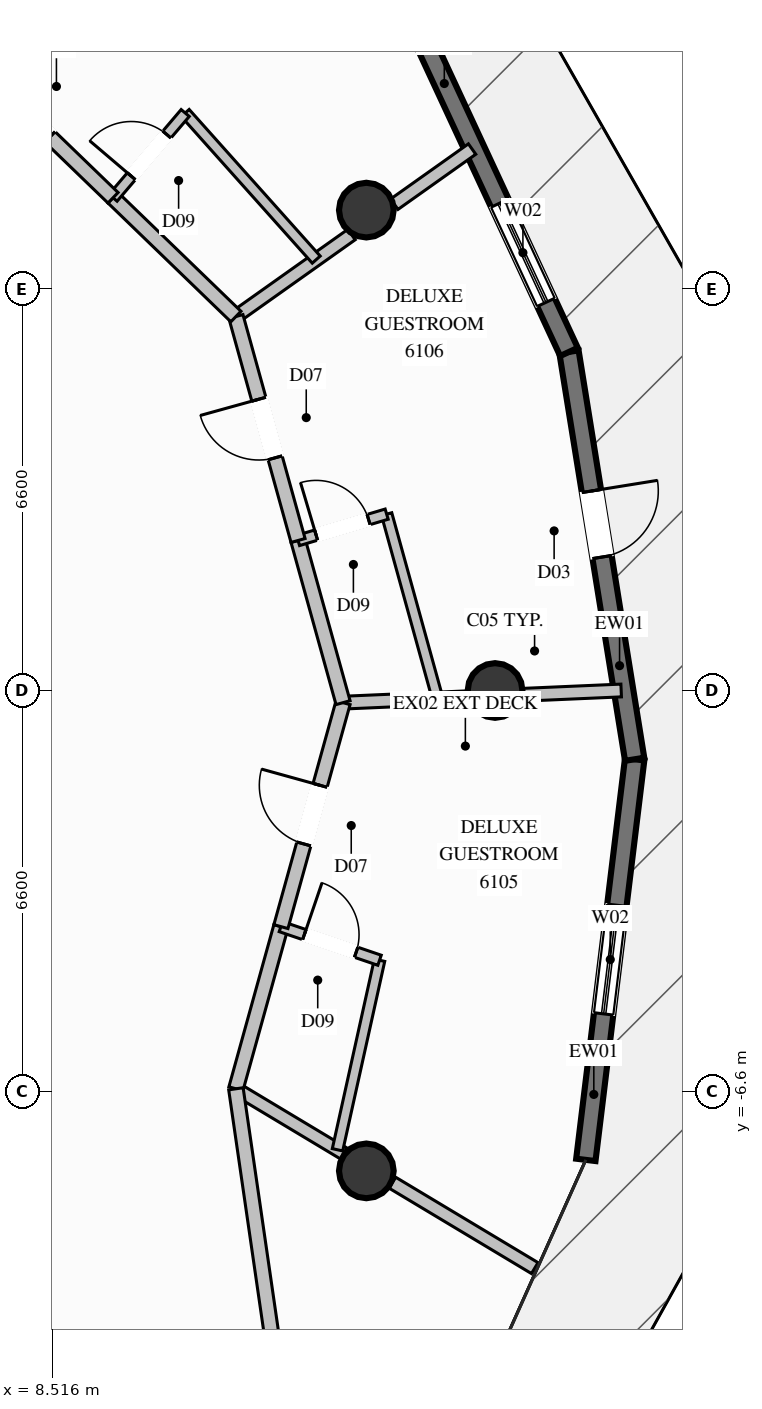
"""IFC4 building model, lengths in metres.
Left out: names, types, materials, properties, quantities, classifications, styles, units other than length and angle.
Written with IfcOpenShell. Run it as: python <this file> out.ifc"""

import sys

from ifc_helpers import new_model, si_unit, direction, frame, frame_2d, origin, origin_2d, place, context, subcontext, project, spatial, rectangle, circle, extrude, element, fill, save


model = new_model("IFC4")
c1 = context("Model", 3, precision=1e-05, world=origin(), true_north=direction((0.0, 1.0)))
c2 = subcontext(c1, "Body", "Model", "MODEL_VIEW")
j1 = project(units=[si_unit("LENGTHUNIT", "METRE"), si_unit("PLANEANGLEUNIT", "RADIAN")], contexts=[c1])
p1 = place(None, origin())
s1 = spatial("IfcSite", under=j1, at=p1, CompositionType="ELEMENT")
p2 = place(p1, origin())
s2 = spatial("IfcBuilding", under=s1, at=p2, CompositionType="ELEMENT")
p3 = place(p2, frame((0.0, 0.0, 227.2)))
s3 = spatial("IfcBuildingStorey", under=s2, at=p3, CompositionType="ELEMENT", Elevation=227.2)
for number, where, z_axis, x_axis in (
    (1, (15.8, 0.0, 0.0), (0.0, 0.0, 1.0), (1.0, 0.0, 0.0)),
    (2, (13.683, 7.9, 0.0), (0.0, 0.0, 1.0), (1.0, 0.0, 0.0)),
    (3, (13.683, -7.9, 0.0), (0.0, 0.0, 1.0), (1.0, 0.0, 0.0)),
):
    element("IfcColumn", number, at=place(p3, frame(where, z_axis=z_axis, x_axis=x_axis)), inside=s3, PredefinedType="COLUMN", context=c2, shape_type="SweptSolid", body=[
        extrude(circle(Radius=0.45, at=origin_2d()), origin(), (0.0, 0.0, 1.0), 3.6),
    ])
p4 = place(p3, frame((18.096, -1.131, 0.0), z_axis=(0.0, 0.0, 1.0), x_axis=(-0.12099160472, -0.992653530486, 0.0)))
e4 = element("IfcWall", 4, at=p4, inside=s3, PredefinedType="SOLIDWALL", context=c2, shape_type="SweptSolid", body=[
    extrude(rectangle(XDim=6.637, YDim=0.32, at=frame_2d((3.318, 0.0))), origin(), (0.0, 0.0, 1.0), 3.36),
])
p5 = place(p4, frame((2.418, 0.0, 0.35)))
e5 = element("IfcOpeningElement", 5, at=p5, cuts=e4, PredefinedType="OPENING", context=c2, shape_type="SweptSolid", body=[
    extrude(rectangle(XDim=1.8, YDim=2.6, at=frame_2d((0.9, 1.3))), frame((0.0, 0.17, 0.0), z_axis=(0.0, -1.0, 0.0), x_axis=(1.0, 0.0, 0.0)), (0.0, 0.0, 1.0), 0.34),
])
p6 = place(p3, frame((17.016, 5.568, 0.0), z_axis=(0.0, 0.0, 1.0), x_axis=(0.159134025561, -0.987256988787, 0.0)))
e6 = element("IfcWall", 6, at=p6, inside=s3, PredefinedType="SOLIDWALL", context=c2, shape_type="SweptSolid", body=[
    extrude(rectangle(XDim=6.786, YDim=0.32, at=frame_2d((3.393, 0.0))), origin(), (0.0, 0.0, 1.0), 3.36),
])
p7 = place(p6, frame((2.317, 0.0, 0.0)))
e7 = element("IfcOpeningElement", 7, at=p7, cuts=e6, PredefinedType="OPENING", context=c2, shape_type="SweptSolid", body=[
    extrude(rectangle(XDim=1.1, YDim=2.2, at=frame_2d((0.55, 1.1))), frame((0.0, 0.17, 0.0), z_axis=(0.0, -1.0, 0.0), x_axis=(1.0, 0.0, 0.0)), (0.0, 0.0, 1.0), 0.34),
])
p8 = place(p3, frame((14.157, 11.721, 0.0), z_axis=(0.0, 0.0, 1.0), x_axis=(0.421409426627, -0.906870495247, 0.0)))
e8 = element("IfcWall", 8, at=p8, inside=s3, PredefinedType="SOLIDWALL", context=c2, shape_type="SweptSolid", body=[
    extrude(rectangle(XDim=6.785, YDim=0.32, at=frame_2d((3.392, 0.0))), origin(), (0.0, 0.0, 1.0), 3.36),
])
p9 = place(p8, frame((4.086, 0.0, 0.35)))
e9 = element("IfcOpeningElement", 9, at=p9, cuts=e8, PredefinedType="OPENING", context=c2, shape_type="SweptSolid", body=[
    extrude(rectangle(XDim=1.8, YDim=2.6, at=frame_2d((0.9, 1.3))), frame((0.0, 0.17, 0.0), z_axis=(0.0, -1.0, 0.0), x_axis=(1.0, 0.0, 0.0)), (0.0, 0.0, 1.0), 0.34),
])
p10 = place(p3, frame((13.3, -0.2, 0.0), z_axis=(0.0, 0.0, 1.0), x_axis=(0.999055257084, 0.043457948563, 0.0)))
e10 = element("IfcWall", 10, at=p10, inside=s3, PredefinedType="PARTITIONING", context=c2, shape_type="SweptSolid", body=[
    extrude(rectangle(XDim=2.045, YDim=0.21, at=frame_2d((1.022, 0.0))), origin(), (0.0, 0.0, 1.0), 3.36),
])
p11 = place(p3, frame((16.265, -0.07, 0.0), z_axis=(0.0, 0.0, 1.0), x_axis=(0.99905329622, 0.043503003492, 0.0)))
e11 = element("IfcWall", 11, at=p11, inside=s3, PredefinedType="PARTITIONING", context=c2, shape_type="SweptSolid", body=[
    extrude(rectangle(XDim=1.611, YDim=0.21, at=frame_2d((0.805, 0.0))), origin(), (0.0, 0.0, 1.0), 3.36),
])
p12 = place(p3, frame((11.538, 6.15, 0.0), z_axis=(0.0, 0.0, 1.0), x_axis=(0.815682557634, 0.578499753822, 0.0)))
e12 = element("IfcWall", 12, at=p12, inside=s3, PredefinedType="PARTITIONING", context=c2, shape_type="SweptSolid", body=[
    extrude(rectangle(XDim=2.33, YDim=0.21, at=frame_2d((1.165, 0.0))), origin(), (0.0, 0.0, 1.0), 2.876),
])
p13 = place(p3, frame((14.143, 7.997, 0.0), z_axis=(0.0, 0.0, 1.0), x_axis=(0.815727547958, 0.5784363124, 0.0)))
e13 = element("IfcWall", 13, at=p13, inside=s3, PredefinedType="PARTITIONING", context=c2, shape_type="SweptSolid", body=[
    extrude(rectangle(XDim=1.568, YDim=0.21, at=frame_2d((0.784, 0.0))), origin(), (0.0, 0.0, 1.0), 3.36),
])
p14 = place(p3, frame((11.538, -6.55, 0.0), z_axis=(0.0, 0.0, 1.0), x_axis=(0.85753462299, -0.514426253582, 0.0)))
e14 = element("IfcWall", 14, at=p14, inside=s3, PredefinedType="PARTITIONING", context=c2, shape_type="SweptSolid", body=[
    extrude(rectangle(XDim=2.066, YDim=0.21, at=frame_2d((1.033, 0.0))), origin(), (0.0, 0.0, 1.0), 2.876),
])
p15 = place(p3, frame((14.111, -8.094, 0.0), z_axis=(0.0, 0.0, 1.0), x_axis=(0.857500813626, -0.514482608676, 0.0)))
e15 = element("IfcWall", 15, at=p15, inside=s3, PredefinedType="PARTITIONING", context=c2, shape_type="SweptSolid", body=[
    extrude(rectangle(XDim=2.731, YDim=0.21, at=frame_2d((1.365, 0.0))), origin(), (0.0, 0.0, 1.0), 3.36),
])
p16 = place(p3, frame((11.538, -6.55, 0.0), z_axis=(0.0, 0.0, 1.0), x_axis=(0.267361785392, 0.963596220266, 0.0)))
e16 = element("IfcWall", 16, at=p16, inside=s3, PredefinedType="PARTITIONING", context=c2, shape_type="SweptSolid", body=[
    extrude(rectangle(XDim=2.768, YDim=0.24, at=frame_2d((1.384, 0.0))), origin(), (0.0, 0.0, 1.0), 3.36),
])
p17 = place(p3, frame((13.209, -7.553, 0.0), z_axis=(0.0, 0.0, 1.0), x_axis=(0.216412225458, 0.976302078597, 0.0)))
e17 = element("IfcWall", 17, at=p17, inside=s3, PredefinedType="PLUMBINGWALL", context=c2, shape_type="SweptSolid", body=[
    extrude(rectangle(XDim=3.193, YDim=0.175, at=frame_2d((1.596, 0.0))), origin(), (0.0, 0.0, 1.0), 2.929),
])
p18 = place(p3, frame((12.278, -3.883, 0.0), z_axis=(0.0, 0.0, 1.0), x_axis=(0.946495352368, -0.322717442889, 0.0)))
e18 = element("IfcWall", 18, at=p18, inside=s3, PredefinedType="PLUMBINGWALL", context=c2, shape_type="SweptSolid", body=[
    extrude(rectangle(XDim=1.714, YDim=0.175, at=frame_2d((0.857, 0.0))), origin(), (0.0, 0.0, 1.0), 3.36),
])
p19 = place(p18, frame((0.407, 0.0, 0.0)))
e19 = element("IfcOpeningElement", 19, at=p19, cuts=e18, PredefinedType="OPENING", context=c2, shape_type="SweptSolid", body=[
    extrude(rectangle(XDim=0.9, YDim=2.1, at=frame_2d((0.45, 1.05))), frame((0.0, 0.098, 0.0), z_axis=(0.0, -1.0, 0.0), x_axis=(1.0, 0.0, 0.0)), (0.0, 0.0, 1.0), 0.195),
])
p20 = place(p3, frame((12.278, -3.883, 0.0), z_axis=(0.0, 0.0, 1.0), x_axis=(0.267373718537, 0.963592909187, 0.0)))
e20 = element("IfcWall", 20, at=p20, inside=s3, PredefinedType="PARTITIONING", context=c2, shape_type="SweptSolid", body=[
    extrude(rectangle(XDim=3.822, YDim=0.24, at=frame_2d((1.911, 0.0))), origin(), (0.0, 0.0, 1.0), 3.36),
])
p21 = place(p20, frame((1.411, 0.0, 0.0)))
e21 = element("IfcOpeningElement", 21, at=p21, cuts=e20, PredefinedType="OPENING", context=c2, shape_type="SweptSolid", body=[
    extrude(rectangle(XDim=1.0, YDim=2.2, at=frame_2d((0.5, 1.1))), frame((0.0, 0.13, 0.0), z_axis=(0.0, -1.0, 0.0), x_axis=(1.0, 0.0, 0.0)), (0.0, 0.0, 1.0), 0.26),
])
p22 = place(p3, frame((13.3, -0.2, 0.0), z_axis=(0.0, 0.0, 1.0), x_axis=(-0.267361785392, 0.963596220266, 0.0)))
e22 = element("IfcWall", 22, at=p22, inside=s3, PredefinedType="PARTITIONING", context=c2, shape_type="SweptSolid", body=[
    extrude(rectangle(XDim=2.768, YDim=0.24, at=frame_2d((1.384, 0.0))), origin(), (0.0, 0.0, 1.0), 3.36),
])
p23 = place(p3, frame((14.855, -0.132, 0.0), z_axis=(0.0, 0.0, 1.0), x_axis=(-0.266366689027, 0.963871768949, 0.0)))
e23 = element("IfcWall", 23, at=p23, inside=s3, PredefinedType="PLUMBINGWALL", context=c2, shape_type="SweptSolid", body=[
    extrude(rectangle(XDim=3.146, YDim=0.175, at=frame_2d((1.573, 0.0))), origin(), (0.0, 0.0, 1.0), 3.36),
])
p24 = place(p3, frame((12.56, 2.467, 0.0), z_axis=(0.0, 0.0, 1.0), x_axis=(0.958592070546, 0.284782798438, 0.0)))
e24 = element("IfcWall", 24, at=p24, inside=s3, PredefinedType="PLUMBINGWALL", context=c2, shape_type="SweptSolid", body=[
    extrude(rectangle(XDim=1.52, YDim=0.175, at=frame_2d((0.76, 0.0))), origin(), (0.0, 0.0, 1.0), 3.36),
])
p25 = place(p24, frame((0.31, 0.0, 0.0)))
e25 = element("IfcOpeningElement", 25, at=p25, cuts=e24, PredefinedType="OPENING", context=c2, shape_type="SweptSolid", body=[
    extrude(rectangle(XDim=0.9, YDim=2.1, at=frame_2d((0.45, 1.05))), frame((0.0, 0.098, 0.0), z_axis=(0.0, -1.0, 0.0), x_axis=(1.0, 0.0, 0.0)), (0.0, 0.0, 1.0), 0.195),
])
p26 = place(p3, frame((12.56, 2.467, 0.0), z_axis=(0.0, 0.0, 1.0), x_axis=(-0.267390175797, 0.963588342544, 0.0)))
e26 = element("IfcWall", 26, at=p26, inside=s3, PredefinedType="PARTITIONING", context=c2, shape_type="SweptSolid", body=[
    extrude(rectangle(XDim=3.822, YDim=0.24, at=frame_2d((1.911, 0.0))), origin(), (0.0, 0.0, 1.0), 3.36),
])
p27 = place(p26, frame((1.411, 0.0, 0.0)))
e27 = element("IfcOpeningElement", 27, at=p27, cuts=e26, PredefinedType="OPENING", context=c2, shape_type="SweptSolid", body=[
    extrude(rectangle(XDim=1.0, YDim=2.2, at=frame_2d((0.5, 1.1))), frame((0.0, 0.13, 0.0), z_axis=(0.0, -1.0, 0.0), x_axis=(1.0, 0.0, 0.0)), (0.0, 0.0, 1.0), 0.26),
])
p28 = place(p3, frame((11.538, 6.15, 0.0), z_axis=(0.0, 0.0, 1.0), x_axis=(-0.719078080202, 0.694929287463, 0.0)))
e28 = element("IfcWall", 28, at=p28, inside=s3, PredefinedType="PARTITIONING", context=c2, shape_type="SweptSolid", body=[
    extrude(rectangle(XDim=2.811, YDim=0.24, at=frame_2d((1.405, 0.0))), origin(), (0.0, 0.0, 1.0), 3.36),
])
p29 = place(p3, frame((12.859, 7.086, 0.0), z_axis=(0.0, 0.0, 1.0), x_axis=(-0.666357777504, 0.745632156201, 0.0)))
e29 = element("IfcWall", 29, at=p29, inside=s3, PredefinedType="PLUMBINGWALL", context=c2, shape_type="SweptSolid", body=[
    extrude(rectangle(XDim=3.234, YDim=0.175, at=frame_2d((1.617, 0.0))), origin(), (0.0, 0.0, 1.0), 3.36),
])
p30 = place(p3, frame((9.517, 8.103, 0.0), z_axis=(0.0, 0.0, 1.0), x_axis=(0.64830617709, 0.76137973492, 0.0)))
e30 = element("IfcWall", 30, at=p30, inside=s3, PredefinedType="PLUMBINGWALL", context=c2, shape_type="SweptSolid", body=[
    extrude(rectangle(XDim=1.831, YDim=0.175, at=frame_2d((0.916, 0.0))), origin(), (0.0, 0.0, 1.0), 3.36),
])
p31 = place(p30, frame((0.465, 0.0, 0.0)))
e31 = element("IfcOpeningElement", 31, at=p31, cuts=e30, PredefinedType="OPENING", context=c2, shape_type="SweptSolid", body=[
    extrude(rectangle(XDim=0.9, YDim=2.1, at=frame_2d((0.45, 1.05))), frame((0.0, 0.098, 0.0), z_axis=(0.0, -1.0, 0.0), x_axis=(1.0, 0.0, 0.0)), (0.0, 0.0, 1.0), 0.195),
])
p32 = place(p3, frame((9.517, 8.103, 0.0), z_axis=(0.0, 0.0, 1.0), x_axis=(-0.719359188441, 0.694638292931, 0.0)))
e32 = element("IfcWall", 32, at=p32, inside=s3, PredefinedType="PARTITIONING", context=c2, shape_type="SweptSolid", body=[
    extrude(rectangle(XDim=3.881, YDim=0.24, at=frame_2d((1.94, 0.0))), origin(), (0.0, 0.0, 1.0), 3.36),
])
p33 = place(p32, frame((1.441, 0.0, 0.0)))
e33 = element("IfcOpeningElement", 33, at=p33, cuts=e32, PredefinedType="OPENING", context=c2, shape_type="SweptSolid", body=[
    extrude(rectangle(XDim=1.0, YDim=2.2, at=frame_2d((0.5, 1.1))), frame((0.0, 0.13, 0.0), z_axis=(0.0, -1.0, 0.0), x_axis=(1.0, 0.0, 0.0)), (0.0, 0.0, 1.0), 0.26),
])
p34 = place(p3, frame((12.3, -11.8, 0.0), z_axis=(0.0, 0.0, 1.0), x_axis=(-0.143630922764, 0.989631324295, 0.0)))
e34 = element("IfcWall", 34, at=p34, inside=s3, PredefinedType="PARTITIONING", context=c2, shape_type="SweptSolid", body=[
    extrude(rectangle(XDim=5.305, YDim=0.24, at=frame_2d((2.652, 0.0))), origin(), (0.0, 0.0, 1.0), 3.36),
])
p35 = place(p5, origin())
e35 = element("IfcWindow", 35, at=p35, inside=s3, PartitioningType="SINGLE_PANEL", PredefinedType="WINDOW", context=c2, shape_type="SweptSolid", body=[
    extrude(rectangle(XDim=1.8, YDim=2.6, at=frame_2d((0.9, 1.3))), frame((0.0, 0.03, 0.0), z_axis=(0.0, -1.0, 0.0), x_axis=(1.0, 0.0, 0.0)), (0.0, 0.0, 1.0), 0.06),
])
fill(e5, e35)
p36 = place(p7, origin())
e36 = element("IfcDoor", 36, at=p36, inside=s3, OperationType="SINGLE_SWING_LEFT", PredefinedType="DOOR", context=c2, shape_type="SweptSolid", body=[
    extrude(rectangle(XDim=1.1, YDim=2.2, at=frame_2d((0.55, 1.1))), frame((0.0, 0.025, 0.0), z_axis=(0.0, -1.0, 0.0), x_axis=(1.0, 0.0, 0.0)), (0.0, 0.0, 1.0), 0.05),
])
fill(e7, e36)
p37 = place(p9, origin())
e37 = element("IfcWindow", 37, at=p37, inside=s3, PartitioningType="SINGLE_PANEL", PredefinedType="WINDOW", context=c2, shape_type="SweptSolid", body=[
    extrude(rectangle(XDim=1.8, YDim=2.6, at=frame_2d((0.9, 1.3))), frame((0.0, 0.03, 0.0), z_axis=(0.0, -1.0, 0.0), x_axis=(1.0, 0.0, 0.0)), (0.0, 0.0, 1.0), 0.06),
])
fill(e9, e37)
p38 = place(p19, origin())
e38 = element("IfcDoor", 38, at=p38, inside=s3, OperationType="SINGLE_SWING_LEFT", PredefinedType="DOOR", context=c2, shape_type="SweptSolid", body=[
    extrude(rectangle(XDim=0.9, YDim=2.1, at=frame_2d((0.45, 1.05))), frame((0.0, 0.025, 0.0), z_axis=(0.0, -1.0, 0.0), x_axis=(1.0, 0.0, 0.0)), (0.0, 0.0, 1.0), 0.05),
])
fill(e19, e38)
p39 = place(p21, origin())
e39 = element("IfcDoor", 39, at=p39, inside=s3, OperationType="SINGLE_SWING_RIGHT", PredefinedType="DOOR", context=c2, shape_type="SweptSolid", body=[
    extrude(rectangle(XDim=1.0, YDim=2.2, at=frame_2d((0.5, 1.1))), frame((0.0, 0.025, 0.0), z_axis=(0.0, -1.0, 0.0), x_axis=(1.0, 0.0, 0.0)), (0.0, 0.0, 1.0), 0.05),
])
fill(e21, e39)
p40 = place(p25, origin())
e40 = element("IfcDoor", 40, at=p40, inside=s3, OperationType="SINGLE_SWING_LEFT", PredefinedType="DOOR", context=c2, shape_type="SweptSolid", body=[
    extrude(rectangle(XDim=0.9, YDim=2.1, at=frame_2d((0.45, 1.05))), frame((0.0, 0.025, 0.0), z_axis=(0.0, -1.0, 0.0), x_axis=(1.0, 0.0, 0.0)), (0.0, 0.0, 1.0), 0.05),
])
fill(e25, e40)
p41 = place(p27, origin())
e41 = element("IfcDoor", 41, at=p41, inside=s3, OperationType="SINGLE_SWING_RIGHT", PredefinedType="DOOR", context=c2, shape_type="SweptSolid", body=[
    extrude(rectangle(XDim=1.0, YDim=2.2, at=frame_2d((0.5, 1.1))), frame((0.0, 0.025, 0.0), z_axis=(0.0, -1.0, 0.0), x_axis=(1.0, 0.0, 0.0)), (0.0, 0.0, 1.0), 0.05),
])
fill(e27, e41)
p42 = place(p31, origin())
e42 = element("IfcDoor", 42, at=p42, inside=s3, OperationType="SINGLE_SWING_LEFT", PredefinedType="DOOR", context=c2, shape_type="SweptSolid", body=[
    extrude(rectangle(XDim=0.9, YDim=2.1, at=frame_2d((0.45, 1.05))), frame((0.0, 0.025, 0.0), z_axis=(0.0, -1.0, 0.0), x_axis=(1.0, 0.0, 0.0)), (0.0, 0.0, 1.0), 0.05),
])
fill(e31, e42)
save(model, sys.argv[1])
